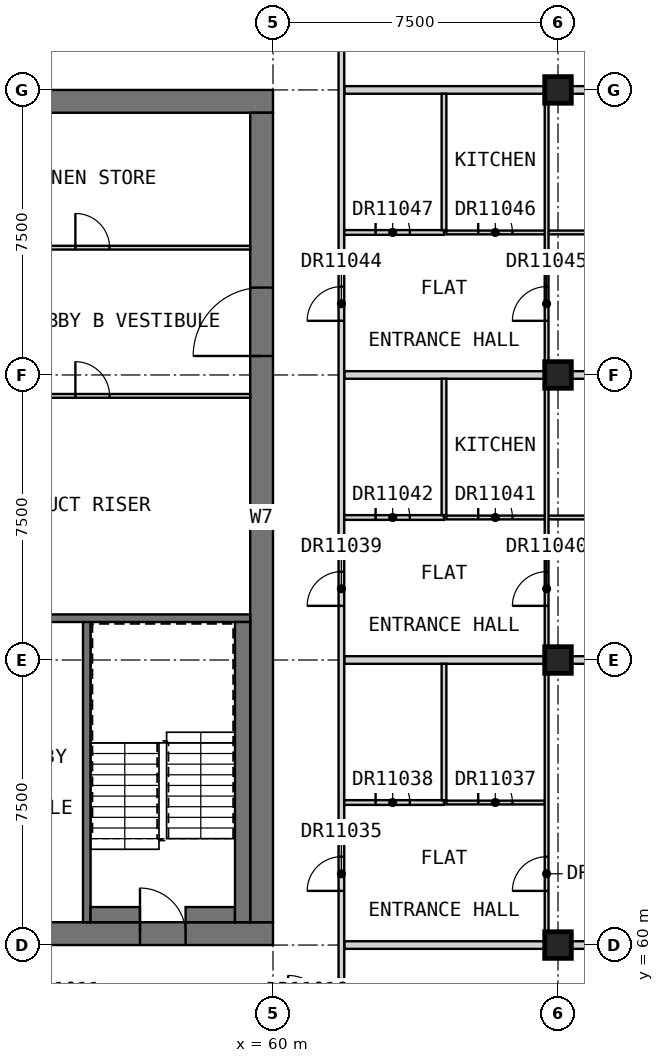
"""IFC4 building model, lengths in metres.
Left out: names, types, materials, properties, quantities, classifications, styles, units other than length and angle.
Written with IfcOpenShell. Run it as: python <this file> out.ifc"""

import sys

from ifc_helpers import new_model, si_unit, direction, frame, frame_2d, origin, origin_2d, place, context, subcontext, project, spatial, rectangle, extrude, element, fill, save


model = new_model("IFC4")
c1 = context("Model", 3, precision=1e-05, world=origin(), true_north=direction((0.0, 1.0)))
c2 = subcontext(c1, "Body", "Model", "MODEL_VIEW")
j1 = project(units=[si_unit("LENGTHUNIT", "METRE"), si_unit("PLANEANGLEUNIT", "RADIAN")], contexts=[c1])
p1 = place(None, origin())
s1 = spatial("IfcSite", under=j1, at=p1, CompositionType="ELEMENT")
p2 = place(p1, origin())
s2 = spatial("IfcBuilding", under=s1, at=p2, CompositionType="ELEMENT")
p3 = place(p2, frame((0.0, 0.0, 276.7)))
s3 = spatial("IfcBuildingStorey", under=s2, at=p3, CompositionType="ELEMENT", Elevation=276.7)
for number, where, z_axis, x_axis in (
    (1, (67.5, 60.0, 0.0), (0.0, 0.0, 1.0), (1.0, 0.0, 0.0)),
    (2, (67.5, 67.5, 0.0), (0.0, 0.0, 1.0), (1.0, 0.0, 0.0)),
    (3, (67.5, 75.0, 0.0), (0.0, 0.0, 1.0), (1.0, 0.0, 0.0)),
    (4, (67.5, 82.5, 0.0), (0.0, 0.0, 1.0), (1.0, 0.0, 0.0)),
):
    element("IfcColumn", number, at=place(p3, frame(where, z_axis=z_axis, x_axis=x_axis)), inside=s3, PredefinedType="COLUMN", context=c2, shape_type="SweptSolid", body=[
        extrude(rectangle(XDim=0.7, YDim=0.7, at=origin_2d()), origin(), (0.0, 0.0, 1.0), 3.5),
    ])
p4 = place(p3, frame((30.0, 60.3, 0.0), z_axis=(0.0, 0.0, 1.0), x_axis=(1.0, 0.0, 0.0)))
e5 = element("IfcWall", 5, at=p4, inside=s3, PredefinedType="SHEAR", context=c2, shape_type="SweptSolid", body=[
    extrude(rectangle(XDim=30.0, YDim=0.6, at=frame_2d((15.0, 0.0))), origin(), (0.0, 0.0, 1.0), 3.5),
])
p5 = place(p4, frame((21.9, 0.0, 0.0)))
e6 = element("IfcOpeningElement", 6, at=p5, cuts=e5, PredefinedType="OPENING", context=c2, shape_type="SweptSolid", body=[
    extrude(rectangle(XDim=1.8, YDim=2.1, at=frame_2d((0.9, 1.05))), frame((0.0, 0.31, 0.0), z_axis=(0.0, -1.0, 0.0), x_axis=(1.0, 0.0, 0.0)), (0.0, 0.0, 1.0), 0.62),
])
p6 = place(p4, frame((26.5, 0.0, 0.0)))
e7 = element("IfcOpeningElement", 7, at=p6, cuts=e5, PredefinedType="OPENING", context=c2, shape_type="SweptSolid", body=[
    extrude(rectangle(XDim=1.2, YDim=2.1, at=frame_2d((0.6, 1.05))), frame((0.0, 0.31, 0.0), z_axis=(0.0, -1.0, 0.0), x_axis=(1.0, 0.0, 0.0)), (0.0, 0.0, 1.0), 0.62),
])
p7 = place(p3, frame((30.0, 82.2, 0.0), z_axis=(0.0, 0.0, 1.0), x_axis=(1.0, 0.0, 0.0)))
e8 = element("IfcWall", 8, at=p7, inside=s3, PredefinedType="SHEAR", context=c2, shape_type="SweptSolid", body=[
    extrude(rectangle(XDim=30.0, YDim=0.6, at=frame_2d((15.0, 0.0))), origin(), (0.0, 0.0, 1.0), 3.5),
])
p8 = place(p3, frame((59.7, 60.6, 0.0), z_axis=(0.0, 0.0, 1.0), x_axis=(0.0, 1.0, 0.0)))
e9 = element("IfcWall", 9, at=p8, inside=s3, PredefinedType="SHEAR", context=c2, shape_type="SweptSolid", body=[
    extrude(rectangle(XDim=21.3, YDim=0.6, at=frame_2d((10.65, 0.0))), origin(), (0.0, 0.0, 1.0), 3.5),
])
p9 = place(p8, frame((14.9, 0.0, 0.0)))
e10 = element("IfcOpeningElement", 10, at=p9, cuts=e9, PredefinedType="OPENING", context=c2, shape_type="SweptSolid", body=[
    extrude(rectangle(XDim=1.8, YDim=2.1, at=frame_2d((0.9, 1.05))), frame((0.0, 0.31, 0.0), z_axis=(0.0, -1.0, 0.0), x_axis=(1.0, 0.0, 0.0)), (0.0, 0.0, 1.0), 0.62),
])
p10 = place(p3, frame((55.1, 60.6, 0.0), z_axis=(0.0, 0.0, 1.0), x_axis=(0.0, 1.0, 0.0)))
e11 = element("IfcWall", 11, at=p10, inside=s3, PredefinedType="SOLIDWALL", context=c2, shape_type="SweptSolid", body=[
    extrude(rectangle(XDim=8.0, YDim=0.2, at=frame_2d((4.0, 0.0))), origin(), (0.0, 0.0, 1.0), 3.25),
])
p11 = place(p3, frame((51.1, 68.6, 0.0), z_axis=(0.0, 0.0, 1.0), x_axis=(1.0, 0.0, 0.0)))
e12 = element("IfcWall", 12, at=p11, inside=s3, PredefinedType="SOLIDWALL", context=c2, shape_type="SweptSolid", body=[
    extrude(rectangle(XDim=8.3, YDim=0.2, at=frame_2d((4.15, 0.0))), origin(), (0.0, 0.0, 1.0), 3.25),
])
for number, where, z_axis, x_axis in (
    (13, (55.2, 60.8, 0.0), (0.0, 0.0, 1.0), (1.0, 0.0, 0.0)),
    (14, (57.7, 60.8, 0.0), (0.0, 0.0, 1.0), (1.0, 0.0, 0.0)),
):
    element("IfcWall", number, at=place(p3, frame(where, z_axis=z_axis, x_axis=x_axis)), inside=s3, PredefinedType="SOLIDWALL", context=c2, shape_type="SweptSolid", body=[
        extrude(rectangle(XDim=1.3, YDim=0.4, at=frame_2d((0.65, 0.0))), origin(), (0.0, 0.0, 1.0), 3.25),
    ])
p12 = place(p3, frame((59.2, 60.6, 0.0), z_axis=(0.0, 0.0, 1.0), x_axis=(0.0, 1.0, 0.0)))
e15 = element("IfcWall", 15, at=p12, inside=s3, PredefinedType="SOLIDWALL", context=c2, shape_type="SweptSolid", body=[
    extrude(rectangle(XDim=7.9, YDim=0.4, at=frame_2d((3.95, 0.0))), origin(), (0.0, 0.0, 1.0), 3.25),
])
p13 = place(p3, frame((51.1, 74.45, 0.0), z_axis=(0.0, 0.0, 1.0), x_axis=(1.0, 0.0, 0.0)))
e16 = element("IfcWall", 16, at=p13, inside=s3, PredefinedType="PARTITIONING", context=c2, shape_type="SweptSolid", body=[
    extrude(rectangle(XDim=8.3, YDim=0.1, at=frame_2d((4.15, 0.0))), origin(), (0.0, 0.0, 1.0), 3.25),
])
p14 = place(p13, frame((3.7, 0.0, 0.0)))
e17 = element("IfcOpeningElement", 17, at=p14, cuts=e16, PredefinedType="OPENING", context=c2, shape_type="SweptSolid", body=[
    extrude(rectangle(XDim=0.9, YDim=2.1, at=frame_2d((0.45, 1.05))), frame((0.0, 0.06, 0.0), z_axis=(0.0, -1.0, 0.0), x_axis=(1.0, 0.0, 0.0)), (0.0, 0.0, 1.0), 0.12),
])
p15 = place(p3, frame((51.1, 78.35, 0.0), z_axis=(0.0, 0.0, 1.0), x_axis=(1.0, 0.0, 0.0)))
e18 = element("IfcWall", 18, at=p15, inside=s3, PredefinedType="PARTITIONING", context=c2, shape_type="SweptSolid", body=[
    extrude(rectangle(XDim=8.3, YDim=0.1, at=frame_2d((4.15, 0.0))), origin(), (0.0, 0.0, 1.0), 3.25),
])
p16 = place(p15, frame((3.7, 0.0, 0.0)))
e19 = element("IfcOpeningElement", 19, at=p16, cuts=e18, PredefinedType="OPENING", context=c2, shape_type="SweptSolid", body=[
    extrude(rectangle(XDim=0.9, YDim=2.1, at=frame_2d((0.45, 1.05))), frame((0.0, 0.06, 0.0), z_axis=(0.0, -1.0, 0.0), x_axis=(1.0, 0.0, 0.0)), (0.0, 0.0, 1.0), 0.12),
])
for number, where, z_axis, x_axis in (
    (20, (61.875, 60.0, 0.0), (0.0, 0.0, 1.0), (1.0, 0.0, 0.0)),
    (21, (61.875, 67.5, 0.0), (0.0, 0.0, 1.0), (1.0, 0.0, 0.0)),
    (22, (61.875, 75.0, 0.0), (0.0, 0.0, 1.0), (1.0, 0.0, 0.0)),
    (23, (61.875, 82.5, 0.0), (0.0, 0.0, 1.0), (1.0, 0.0, 0.0)),
):
    element("IfcWall", number, at=place(p3, frame(where, z_axis=z_axis, x_axis=x_axis)), inside=s3, PredefinedType="PARTITIONING", context=c2, shape_type="SweptSolid", body=[
        extrude(rectangle(XDim=13.125, YDim=0.2, at=frame_2d((6.562, 0.0))), origin(), (0.0, 0.0, 1.0), 3.25),
    ])
p17 = place(p3, frame((61.8, 58.275, 0.0), z_axis=(0.0, 0.0, 1.0), x_axis=(0.0, 1.0, 0.0)))
e24 = element("IfcWall", 24, at=p17, inside=s3, PredefinedType="PARTITIONING", context=c2, shape_type="SweptSolid", body=[
    extrude(rectangle(XDim=25.95, YDim=0.15, at=frame_2d((12.975, 0.0))), origin(), (0.0, 0.0, 1.0), 3.25),
])
p18 = place(p17, frame((3.15, 0.0, 0.0)))
e25 = element("IfcOpeningElement", 25, at=p18, cuts=e24, PredefinedType="OPENING", context=c2, shape_type="SweptSolid", body=[
    extrude(rectangle(XDim=0.9, YDim=2.1, at=frame_2d((0.45, 1.05))), frame((0.0, 0.085, 0.0), z_axis=(0.0, -1.0, 0.0), x_axis=(1.0, 0.0, 0.0)), (0.0, 0.0, 1.0), 0.17),
])
p19 = place(p17, frame((10.65, 0.0, 0.0)))
e26 = element("IfcOpeningElement", 26, at=p19, cuts=e24, PredefinedType="OPENING", context=c2, shape_type="SweptSolid", body=[
    extrude(rectangle(XDim=0.9, YDim=2.1, at=frame_2d((0.45, 1.05))), frame((0.0, 0.085, 0.0), z_axis=(0.0, -1.0, 0.0), x_axis=(1.0, 0.0, 0.0)), (0.0, 0.0, 1.0), 0.17),
])
p20 = place(p17, frame((18.15, 0.0, 0.0)))
e27 = element("IfcOpeningElement", 27, at=p20, cuts=e24, PredefinedType="OPENING", context=c2, shape_type="SweptSolid", body=[
    extrude(rectangle(XDim=0.9, YDim=2.1, at=frame_2d((0.45, 1.05))), frame((0.0, 0.085, 0.0), z_axis=(0.0, -1.0, 0.0), x_axis=(1.0, 0.0, 0.0)), (0.0, 0.0, 1.0), 0.17),
])
p21 = place(p3, frame((64.562, 63.75, 0.0), z_axis=(0.0, 0.0, 1.0), x_axis=(1.0, 0.0, 0.0)))
e28 = element("IfcWall", 28, at=p21, inside=s3, PredefinedType="PARTITIONING", context=c2, shape_type="SweptSolid", body=[
    extrude(rectangle(XDim=2.587, YDim=0.1, at=frame_2d((1.294, 0.0))), origin(), (0.0, 0.0, 1.0), 3.25),
])
p22 = place(p21, frame((0.837, 0.0, 0.0)))
e29 = element("IfcOpeningElement", 29, at=p22, cuts=e28, PredefinedType="OPENING", context=c2, shape_type="SweptSolid", body=[
    extrude(rectangle(XDim=0.9, YDim=2.1, at=frame_2d((0.45, 1.05))), frame((0.0, 0.06, 0.0), z_axis=(0.0, -1.0, 0.0), x_axis=(1.0, 0.0, 0.0)), (0.0, 0.0, 1.0), 0.12),
])
p23 = place(p3, frame((64.562, 71.25, 0.0), z_axis=(0.0, 0.0, 1.0), x_axis=(1.0, 0.0, 0.0)))
e30 = element("IfcWall", 30, at=p23, inside=s3, PredefinedType="PARTITIONING", context=c2, shape_type="SweptSolid", body=[
    extrude(rectangle(XDim=9.627, YDim=0.1, at=frame_2d((4.814, 0.0))), origin(), (0.0, 0.0, 1.0), 3.25),
])
p24 = place(p23, frame((0.837, 0.0, 0.0)))
e31 = element("IfcOpeningElement", 31, at=p24, cuts=e30, PredefinedType="OPENING", context=c2, shape_type="SweptSolid", body=[
    extrude(rectangle(XDim=0.9, YDim=2.1, at=frame_2d((0.45, 1.05))), frame((0.0, 0.06, 0.0), z_axis=(0.0, -1.0, 0.0), x_axis=(1.0, 0.0, 0.0)), (0.0, 0.0, 1.0), 0.12),
])
p25 = place(p23, frame((6.087, 0.0, 0.0)))
e32 = element("IfcOpeningElement", 32, at=p25, cuts=e30, PredefinedType="OPENING", context=c2, shape_type="SweptSolid", body=[
    extrude(rectangle(XDim=0.9, YDim=2.1, at=frame_2d((0.45, 1.05))), frame((0.0, 0.06, 0.0), z_axis=(0.0, -1.0, 0.0), x_axis=(1.0, 0.0, 0.0)), (0.0, 0.0, 1.0), 0.12),
])
p26 = place(p3, frame((64.562, 78.75, 0.0), z_axis=(0.0, 0.0, 1.0), x_axis=(1.0, 0.0, 0.0)))
e33 = element("IfcWall", 33, at=p26, inside=s3, PredefinedType="PARTITIONING", context=c2, shape_type="SweptSolid", body=[
    extrude(rectangle(XDim=9.627, YDim=0.1, at=frame_2d((4.814, 0.0))), origin(), (0.0, 0.0, 1.0), 3.25),
])
p27 = place(p26, frame((0.837, 0.0, 0.0)))
e34 = element("IfcOpeningElement", 34, at=p27, cuts=e33, PredefinedType="OPENING", context=c2, shape_type="SweptSolid", body=[
    extrude(rectangle(XDim=0.9, YDim=2.1, at=frame_2d((0.45, 1.05))), frame((0.0, 0.06, 0.0), z_axis=(0.0, -1.0, 0.0), x_axis=(1.0, 0.0, 0.0)), (0.0, 0.0, 1.0), 0.12),
])
p28 = place(p26, frame((6.087, 0.0, 0.0)))
e35 = element("IfcOpeningElement", 35, at=p28, cuts=e33, PredefinedType="OPENING", context=c2, shape_type="SweptSolid", body=[
    extrude(rectangle(XDim=0.9, YDim=2.1, at=frame_2d((0.45, 1.05))), frame((0.0, 0.06, 0.0), z_axis=(0.0, -1.0, 0.0), x_axis=(1.0, 0.0, 0.0)), (0.0, 0.0, 1.0), 0.12),
])
p29 = place(p3, frame((67.2, 60.1, 0.0), z_axis=(0.0, 0.0, 1.0), x_axis=(0.0, 1.0, 0.0)))
e36 = element("IfcWall", 36, at=p29, inside=s3, PredefinedType="PARTITIONING", context=c2, shape_type="SweptSolid", body=[
    extrude(rectangle(XDim=22.3, YDim=0.1, at=frame_2d((11.15, 0.0))), origin(), (0.0, 0.0, 1.0), 3.25),
])
p30 = place(p29, frame((1.325, 0.0, 0.0)))
e37 = element("IfcOpeningElement", 37, at=p30, cuts=e36, PredefinedType="OPENING", context=c2, shape_type="SweptSolid", body=[
    extrude(rectangle(XDim=0.9, YDim=2.1, at=frame_2d((0.45, 1.05))), frame((0.0, 0.06, 0.0), z_axis=(0.0, -1.0, 0.0), x_axis=(1.0, 0.0, 0.0)), (0.0, 0.0, 1.0), 0.12),
])
p31 = place(p29, frame((8.825, 0.0, 0.0)))
e38 = element("IfcOpeningElement", 38, at=p31, cuts=e36, PredefinedType="OPENING", context=c2, shape_type="SweptSolid", body=[
    extrude(rectangle(XDim=0.9, YDim=2.1, at=frame_2d((0.45, 1.05))), frame((0.0, 0.06, 0.0), z_axis=(0.0, -1.0, 0.0), x_axis=(1.0, 0.0, 0.0)), (0.0, 0.0, 1.0), 0.12),
])
p32 = place(p29, frame((16.325, 0.0, 0.0)))
e39 = element("IfcOpeningElement", 39, at=p32, cuts=e36, PredefinedType="OPENING", context=c2, shape_type="SweptSolid", body=[
    extrude(rectangle(XDim=0.9, YDim=2.1, at=frame_2d((0.45, 1.05))), frame((0.0, 0.06, 0.0), z_axis=(0.0, -1.0, 0.0), x_axis=(1.0, 0.0, 0.0)), (0.0, 0.0, 1.0), 0.12),
])
p33 = place(p3, frame((61.875, 63.75, 0.0), z_axis=(0.0, 0.0, 1.0), x_axis=(1.0, 0.0, 0.0)))
e40 = element("IfcWall", 40, at=p33, inside=s3, PredefinedType="PARTITIONING", context=c2, shape_type="SweptSolid", body=[
    extrude(rectangle(XDim=2.625, YDim=0.125, at=frame_2d((1.312, 0.0))), origin(), (0.0, 0.0, 1.0), 3.25),
])
p34 = place(p33, frame((0.825, 0.0, 0.0)))
e41 = element("IfcOpeningElement", 41, at=p34, cuts=e40, PredefinedType="OPENING", context=c2, shape_type="SweptSolid", body=[
    extrude(rectangle(XDim=0.9, YDim=2.1, at=frame_2d((0.45, 1.05))), frame((0.0, 0.073, 0.0), z_axis=(0.0, -1.0, 0.0), x_axis=(1.0, 0.0, 0.0)), (0.0, 0.0, 1.0), 0.145),
])
p35 = place(p3, frame((61.875, 71.25, 0.0), z_axis=(0.0, 0.0, 1.0), x_axis=(1.0, 0.0, 0.0)))
e42 = element("IfcWall", 42, at=p35, inside=s3, PredefinedType="PARTITIONING", context=c2, shape_type="SweptSolid", body=[
    extrude(rectangle(XDim=2.625, YDim=0.125, at=frame_2d((1.312, 0.0))), origin(), (0.0, 0.0, 1.0), 3.25),
])
p36 = place(p35, frame((0.825, 0.0, 0.0)))
e43 = element("IfcOpeningElement", 43, at=p36, cuts=e42, PredefinedType="OPENING", context=c2, shape_type="SweptSolid", body=[
    extrude(rectangle(XDim=0.9, YDim=2.1, at=frame_2d((0.45, 1.05))), frame((0.0, 0.073, 0.0), z_axis=(0.0, -1.0, 0.0), x_axis=(1.0, 0.0, 0.0)), (0.0, 0.0, 1.0), 0.145),
])
p37 = place(p3, frame((61.875, 78.75, 0.0), z_axis=(0.0, 0.0, 1.0), x_axis=(1.0, 0.0, 0.0)))
e44 = element("IfcWall", 44, at=p37, inside=s3, PredefinedType="PARTITIONING", context=c2, shape_type="SweptSolid", body=[
    extrude(rectangle(XDim=2.625, YDim=0.125, at=frame_2d((1.312, 0.0))), origin(), (0.0, 0.0, 1.0), 3.25),
])
p38 = place(p37, frame((0.825, 0.0, 0.0)))
e45 = element("IfcOpeningElement", 45, at=p38, cuts=e44, PredefinedType="OPENING", context=c2, shape_type="SweptSolid", body=[
    extrude(rectangle(XDim=0.9, YDim=2.1, at=frame_2d((0.45, 1.05))), frame((0.0, 0.073, 0.0), z_axis=(0.0, -1.0, 0.0), x_axis=(1.0, 0.0, 0.0)), (0.0, 0.0, 1.0), 0.145),
])
for number, where, z_axis, x_axis in (
    (46, (64.5, 63.812, 0.0), (0.0, 0.0, 1.0), (0.0, 1.0, 0.0)),
    (47, (64.5, 71.312, 0.0), (0.0, 0.0, 1.0), (0.0, 1.0, 0.0)),
    (48, (64.5, 78.812, 0.0), (0.0, 0.0, 1.0), (0.0, 1.0, 0.0)),
):
    element("IfcWall", number, at=place(p3, frame(where, z_axis=z_axis, x_axis=x_axis)), inside=s3, PredefinedType="PARTITIONING", context=c2, shape_type="SweptSolid", body=[
        extrude(rectangle(XDim=3.587, YDim=0.125, at=frame_2d((1.794, 0.0))), origin(), (0.0, 0.0, 1.0), 3.25),
    ])
p39 = place(p9, origin())
e49 = element("IfcDoor", 49, at=p39, inside=s3, OperationType="DOUBLE_DOOR_SINGLE_SWING", PredefinedType="DOOR", context=c2, shape_type="SweptSolid", body=[
    extrude(rectangle(XDim=1.8, YDim=2.1, at=frame_2d((0.9, 1.05))), frame((0.0, 0.025, 0.0), z_axis=(0.0, -1.0, 0.0), x_axis=(1.0, 0.0, 0.0)), (0.0, 0.0, 1.0), 0.05),
])
fill(e10, e49)
p40 = place(p6, origin())
e50 = element("IfcDoor", 50, at=p40, inside=s3, OperationType="SINGLE_SWING_LEFT", PredefinedType="DOOR", context=c2, shape_type="SweptSolid", body=[
    extrude(rectangle(XDim=1.2, YDim=2.1, at=frame_2d((0.6, 1.05))), frame((0.0, 0.025, 0.0), z_axis=(0.0, -1.0, 0.0), x_axis=(1.0, 0.0, 0.0)), (0.0, 0.0, 1.0), 0.05),
])
fill(e7, e50)
p41 = place(p14, origin())
e51 = element("IfcDoor", 51, at=p41, inside=s3, OperationType="SINGLE_SWING_LEFT", PredefinedType="DOOR", context=c2, shape_type="SweptSolid", body=[
    extrude(rectangle(XDim=0.9, YDim=2.1, at=frame_2d((0.45, 1.05))), frame((0.0, 0.025, 0.0), z_axis=(0.0, -1.0, 0.0), x_axis=(1.0, 0.0, 0.0)), (0.0, 0.0, 1.0), 0.05),
])
fill(e17, e51)
p42 = place(p16, origin())
e52 = element("IfcDoor", 52, at=p42, inside=s3, OperationType="SINGLE_SWING_LEFT", PredefinedType="DOOR", context=c2, shape_type="SweptSolid", body=[
    extrude(rectangle(XDim=0.9, YDim=2.1, at=frame_2d((0.45, 1.05))), frame((0.0, 0.025, 0.0), z_axis=(0.0, -1.0, 0.0), x_axis=(1.0, 0.0, 0.0)), (0.0, 0.0, 1.0), 0.05),
])
fill(e19, e52)
p43 = place(p18, origin())
e53 = element("IfcDoor", 53, at=p43, inside=s3, OperationType="SINGLE_SWING_RIGHT", PredefinedType="DOOR", context=c2, shape_type="SweptSolid", body=[
    extrude(rectangle(XDim=0.9, YDim=2.1, at=frame_2d((0.45, 1.05))), frame((0.0, 0.025, 0.0), z_axis=(0.0, -1.0, 0.0), x_axis=(1.0, 0.0, 0.0)), (0.0, 0.0, 1.0), 0.05),
])
fill(e25, e53)
p44 = place(p30, origin())
e54 = element("IfcDoor", 54, at=p44, inside=s3, OperationType="SINGLE_SWING_LEFT", PredefinedType="DOOR", context=c2, shape_type="SweptSolid", body=[
    extrude(rectangle(XDim=0.9, YDim=2.1, at=frame_2d((0.45, 1.05))), frame((0.0, 0.025, 0.0), z_axis=(0.0, -1.0, 0.0), x_axis=(1.0, 0.0, 0.0)), (0.0, 0.0, 1.0), 0.05),
])
fill(e37, e54)
p45 = place(p22, origin())
e55 = element("IfcDoor", 55, at=p45, inside=s3, OperationType="SINGLE_SWING_LEFT", PredefinedType="DOOR", context=c2, shape_type="SweptSolid", body=[
    extrude(rectangle(XDim=0.9, YDim=2.1, at=frame_2d((0.45, 1.05))), frame((0.0, 0.025, 0.0), z_axis=(0.0, -1.0, 0.0), x_axis=(1.0, 0.0, 0.0)), (0.0, 0.0, 1.0), 0.05),
])
fill(e29, e55)
p46 = place(p34, origin())
e56 = element("IfcDoor", 56, at=p46, inside=s3, OperationType="SINGLE_SWING_LEFT", PredefinedType="DOOR", context=c2, shape_type="SweptSolid", body=[
    extrude(rectangle(XDim=0.9, YDim=2.1, at=frame_2d((0.45, 1.05))), frame((0.0, 0.025, 0.0), z_axis=(0.0, -1.0, 0.0), x_axis=(1.0, 0.0, 0.0)), (0.0, 0.0, 1.0), 0.05),
])
fill(e41, e56)
p47 = place(p19, origin())
e57 = element("IfcDoor", 57, at=p47, inside=s3, OperationType="SINGLE_SWING_RIGHT", PredefinedType="DOOR", context=c2, shape_type="SweptSolid", body=[
    extrude(rectangle(XDim=0.9, YDim=2.1, at=frame_2d((0.45, 1.05))), frame((0.0, 0.025, 0.0), z_axis=(0.0, -1.0, 0.0), x_axis=(1.0, 0.0, 0.0)), (0.0, 0.0, 1.0), 0.05),
])
fill(e26, e57)
p48 = place(p31, origin())
e58 = element("IfcDoor", 58, at=p48, inside=s3, OperationType="SINGLE_SWING_LEFT", PredefinedType="DOOR", context=c2, shape_type="SweptSolid", body=[
    extrude(rectangle(XDim=0.9, YDim=2.1, at=frame_2d((0.45, 1.05))), frame((0.0, 0.025, 0.0), z_axis=(0.0, -1.0, 0.0), x_axis=(1.0, 0.0, 0.0)), (0.0, 0.0, 1.0), 0.05),
])
fill(e38, e58)
p49 = place(p24, origin())
e59 = element("IfcDoor", 59, at=p49, inside=s3, OperationType="SINGLE_SWING_LEFT", PredefinedType="DOOR", context=c2, shape_type="SweptSolid", body=[
    extrude(rectangle(XDim=0.9, YDim=2.1, at=frame_2d((0.45, 1.05))), frame((0.0, 0.025, 0.0), z_axis=(0.0, -1.0, 0.0), x_axis=(1.0, 0.0, 0.0)), (0.0, 0.0, 1.0), 0.05),
])
fill(e31, e59)
p50 = place(p36, origin())
e60 = element("IfcDoor", 60, at=p50, inside=s3, OperationType="SINGLE_SWING_LEFT", PredefinedType="DOOR", context=c2, shape_type="SweptSolid", body=[
    extrude(rectangle(XDim=0.9, YDim=2.1, at=frame_2d((0.45, 1.05))), frame((0.0, 0.025, 0.0), z_axis=(0.0, -1.0, 0.0), x_axis=(1.0, 0.0, 0.0)), (0.0, 0.0, 1.0), 0.05),
])
fill(e43, e60)
p51 = place(p20, origin())
e61 = element("IfcDoor", 61, at=p51, inside=s3, OperationType="SINGLE_SWING_RIGHT", PredefinedType="DOOR", context=c2, shape_type="SweptSolid", body=[
    extrude(rectangle(XDim=0.9, YDim=2.1, at=frame_2d((0.45, 1.05))), frame((0.0, 0.025, 0.0), z_axis=(0.0, -1.0, 0.0), x_axis=(1.0, 0.0, 0.0)), (0.0, 0.0, 1.0), 0.05),
])
fill(e27, e61)
p52 = place(p32, origin())
e62 = element("IfcDoor", 62, at=p52, inside=s3, OperationType="SINGLE_SWING_LEFT", PredefinedType="DOOR", context=c2, shape_type="SweptSolid", body=[
    extrude(rectangle(XDim=0.9, YDim=2.1, at=frame_2d((0.45, 1.05))), frame((0.0, 0.025, 0.0), z_axis=(0.0, -1.0, 0.0), x_axis=(1.0, 0.0, 0.0)), (0.0, 0.0, 1.0), 0.05),
])
fill(e39, e62)
p53 = place(p27, origin())
e63 = element("IfcDoor", 63, at=p53, inside=s3, OperationType="SINGLE_SWING_LEFT", PredefinedType="DOOR", context=c2, shape_type="SweptSolid", body=[
    extrude(rectangle(XDim=0.9, YDim=2.1, at=frame_2d((0.45, 1.05))), frame((0.0, 0.025, 0.0), z_axis=(0.0, -1.0, 0.0), x_axis=(1.0, 0.0, 0.0)), (0.0, 0.0, 1.0), 0.05),
])
fill(e34, e63)
p54 = place(p38, origin())
e64 = element("IfcDoor", 64, at=p54, inside=s3, OperationType="SINGLE_SWING_LEFT", PredefinedType="DOOR", context=c2, shape_type="SweptSolid", body=[
    extrude(rectangle(XDim=0.9, YDim=2.1, at=frame_2d((0.45, 1.05))), frame((0.0, 0.025, 0.0), z_axis=(0.0, -1.0, 0.0), x_axis=(1.0, 0.0, 0.0)), (0.0, 0.0, 1.0), 0.05),
])
fill(e45, e64)
save(model, sys.argv[1])
